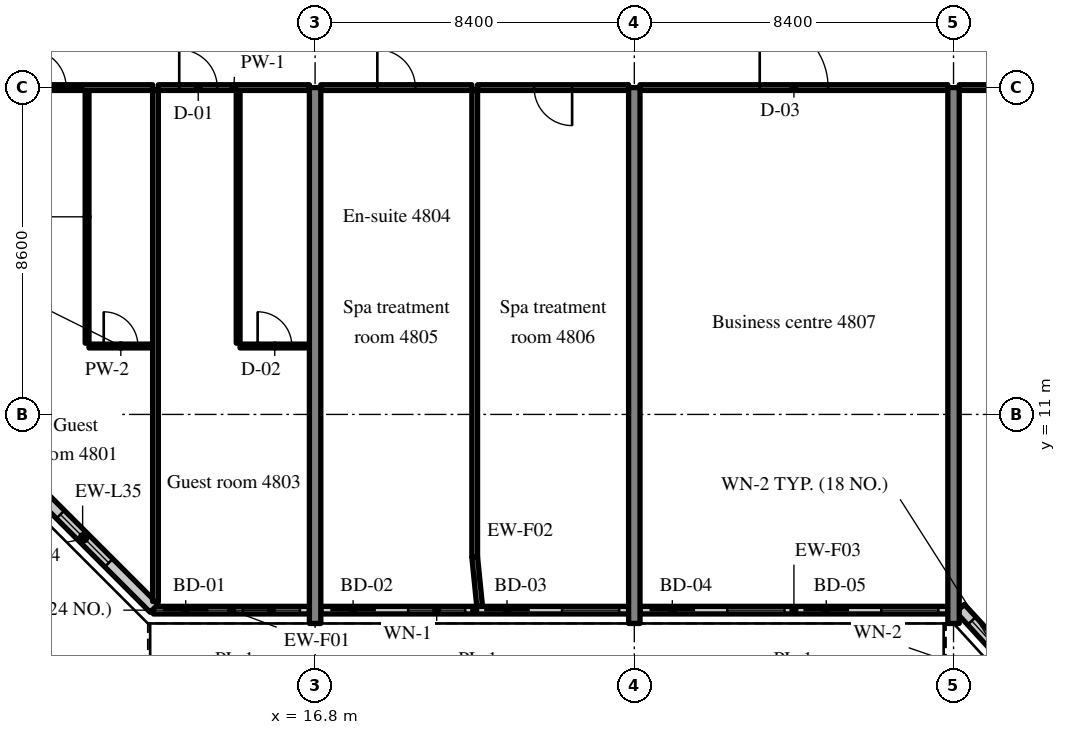
"""IFC4 building model, lengths in metres.
Left out: names, types, materials, properties, quantities, classifications, styles, units other than length and angle.
Written with IfcOpenShell. Run it as: python <this file> out.ifc"""

import sys

from ifc_helpers import new_model, si_unit, direction, frame, frame_2d, origin, place, context, subcontext, project, spatial, rectangle, extrude, source, transform, mapped, element, fill, save


model = new_model("IFC4")
c1 = context("Model", 3, precision=1e-05, world=origin(), true_north=direction((0.0, 1.0)))
c2 = subcontext(c1, "Body", "Model", "MODEL_VIEW")
j1 = project(units=[si_unit("LENGTHUNIT", "METRE"), si_unit("PLANEANGLEUNIT", "RADIAN")], contexts=[c1])
p1 = place(None, origin())
s1 = spatial("IfcSite", under=j1, at=p1, CompositionType="ELEMENT")
p2 = place(p1, origin())
s2 = spatial("IfcBuilding", under=s1, at=p2, CompositionType="ELEMENT")
p3 = place(p2, frame((0.0, 0.0, 197.2)))
s3 = spatial("IfcBuildingStorey", under=s2, at=p3, CompositionType="ELEMENT", Elevation=197.2)
m1 = source(origin(), c2, "Body", "SweptSolid", [
    extrude(rectangle(XDim=14.1, YDim=0.3, at=frame_2d((7.05, 0.0))), origin(), (0.0, 0.0, 1.0), 3.52),
])
for number, where, z_axis, x_axis in (
    (1, (16.8, 5.5, 0.0), (0.0, 0.0, 1.0), (0.0, 1.0, 0.0)),
    (2, (25.2, 5.5, 0.0), (0.0, 0.0, 1.0), (0.0, 1.0, 0.0)),
    (3, (33.6, 5.5, 0.0), (0.0, 0.0, 1.0), (0.0, 1.0, 0.0)),
):
    element("IfcWall", number, at=place(p3, frame(where, z_axis=z_axis, x_axis=x_axis)), inside=s3, PredefinedType="SHEAR", context=c2, shape_type="MappedRepresentation", body=[
        mapped(m1, transform((0.0, 0.0, 0.0), scale=1.0)),
    ])
m2 = source(origin(), c2, "Body", "SweptSolid", [
    extrude(rectangle(XDim=4.105, YDim=0.2, at=frame_2d((2.052, 0.0))), origin(), (0.0, 0.0, 1.0), 2.87),
])
p4 = place(p3, frame((12.545, 5.85, 0.0), z_axis=(0.0, 0.0, 1.0), x_axis=(1.0, 0.0, 0.0)))
e4 = element("IfcWall", 4, at=p4, inside=s3, PredefinedType="SOLIDWALL", context=c2, shape_type="MappedRepresentation", body=[
    mapped(m2, transform((0.0, 0.0, 0.0), scale=1.0)),
])
m3 = source(origin(), c2, "Body", "SweptSolid", [
    extrude(rectangle(XDim=1.2, YDim=2.4, at=frame_2d((0.6, 1.2))), frame((0.0, 0.11, 0.0), z_axis=(0.0, -1.0, 0.0), x_axis=(1.0, 0.0, 0.0)), (0.0, 0.0, 1.0), 0.22),
])
p5 = place(p4, frame((0.25, 0.0, 0.0)))
e5 = element("IfcOpeningElement", 5, at=p5, cuts=e4, PredefinedType="OPENING", context=c2, shape_type="MappedRepresentation", body=[
    mapped(m3, transform((0.0, 0.0, 0.0), scale=1.0)),
])
m4 = source(origin(), c2, "Body", "SweptSolid", [
    extrude(rectangle(XDim=1.5, YDim=1.5, at=frame_2d((0.75, 0.75))), frame((0.0, 0.11, 0.0), z_axis=(0.0, -1.0, 0.0), x_axis=(1.0, 0.0, 0.0)), (0.0, 0.0, 1.0), 0.22),
])
p6 = place(p4, frame((2.355, 0.0, 0.9)))
e6 = element("IfcOpeningElement", 6, at=p6, cuts=e4, PredefinedType="OPENING", context=c2, shape_type="MappedRepresentation", body=[
    mapped(m4, transform((0.0, 0.0, 0.0), scale=1.0)),
])
m5 = source(origin(), c2, "Body", "SweptSolid", [
    extrude(rectangle(XDim=8.1, YDim=0.2, at=frame_2d((4.05, 0.0))), origin(), (0.0, 0.0, 1.0), 2.87),
])
p7 = place(p3, frame((16.95, 5.85, 0.0), z_axis=(0.0, 0.0, 1.0), x_axis=(1.0, 0.0, 0.0)))
e7 = element("IfcWall", 7, at=p7, inside=s3, PredefinedType="SOLIDWALL", context=c2, shape_type="MappedRepresentation", body=[
    mapped(m5, transform((0.0, 0.0, 0.0), scale=1.0)),
])
p8 = place(p7, frame((0.25, 0.0, 0.0)))
e8 = element("IfcOpeningElement", 8, at=p8, cuts=e7, PredefinedType="OPENING", context=c2, shape_type="MappedRepresentation", body=[
    mapped(m3, transform((0.0, 0.0, 0.0), scale=1.0)),
])
p9 = place(p7, frame((2.3, 0.0, 0.9)))
e9 = element("IfcOpeningElement", 9, at=p9, cuts=e7, PredefinedType="OPENING", context=c2, shape_type="MappedRepresentation", body=[
    mapped(m4, transform((0.0, 0.0, 0.0), scale=1.0)),
])
p10 = place(p7, frame((4.3, 0.0, 0.0)))
e10 = element("IfcOpeningElement", 10, at=p10, cuts=e7, PredefinedType="OPENING", context=c2, shape_type="MappedRepresentation", body=[
    mapped(m3, transform((0.0, 0.0, 0.0), scale=1.0)),
])
p11 = place(p7, frame((6.35, 0.0, 0.9)))
e11 = element("IfcOpeningElement", 11, at=p11, cuts=e7, PredefinedType="OPENING", context=c2, shape_type="MappedRepresentation", body=[
    mapped(m4, transform((0.0, 0.0, 0.0), scale=1.0)),
])
m6 = source(origin(), c2, "Body", "SweptSolid", [
    extrude(rectangle(XDim=8.1, YDim=0.2, at=frame_2d((4.05, 0.0))), origin(), (0.0, 0.0, 1.0), 2.87),
])
p12 = place(p3, frame((25.35, 5.85, 0.0), z_axis=(0.0, 0.0, 1.0), x_axis=(1.0, 0.0, 0.0)))
e12 = element("IfcWall", 12, at=p12, inside=s3, PredefinedType="SOLIDWALL", context=c2, shape_type="MappedRepresentation", body=[
    mapped(m6, transform((0.0, 0.0, 0.0), scale=1.0)),
])
p13 = place(p12, frame((0.25, 0.0, 0.0)))
e13 = element("IfcOpeningElement", 13, at=p13, cuts=e12, PredefinedType="OPENING", context=c2, shape_type="MappedRepresentation", body=[
    mapped(m3, transform((0.0, 0.0, 0.0), scale=1.0)),
])
p14 = place(p12, frame((2.3, 0.0, 0.9)))
e14 = element("IfcOpeningElement", 14, at=p14, cuts=e12, PredefinedType="OPENING", context=c2, shape_type="MappedRepresentation", body=[
    mapped(m4, transform((0.0, 0.0, 0.0), scale=1.0)),
])
p15 = place(p12, frame((4.3, 0.0, 0.0)))
e15 = element("IfcOpeningElement", 15, at=p15, cuts=e12, PredefinedType="OPENING", context=c2, shape_type="MappedRepresentation", body=[
    mapped(m3, transform((0.0, 0.0, 0.0), scale=1.0)),
])
p16 = place(p12, frame((6.35, 0.0, 0.9)))
e16 = element("IfcOpeningElement", 16, at=p16, cuts=e12, PredefinedType="OPENING", context=c2, shape_type="MappedRepresentation", body=[
    mapped(m4, transform((0.0, 0.0, 0.0), scale=1.0)),
])
m7 = source(origin(), c2, "Body", "SweptSolid", [
    extrude(rectangle(XDim=2.398, YDim=0.3, at=frame_2d((1.199, 0.0))), origin(), (0.0, 0.0, 1.0), 3.52),
])
p17 = place(p3, frame((33.776, 5.9, 0.0), z_axis=(0.0, 0.0, 1.0), x_axis=(0.675374189419, -0.737475222815, 0.0)))
e17 = element("IfcWall", 17, at=p17, inside=s3, PredefinedType="SOLIDWALL", context=c2, shape_type="MappedRepresentation", body=[
    mapped(m7, transform((0.0, 0.0, 0.0), scale=1.0)),
])
m8 = source(origin(), c2, "Body", "SweptSolid", [
    extrude(rectangle(XDim=1.5, YDim=2.0, at=frame_2d((0.75, 1.0))), frame((0.0, 0.16, 0.0), z_axis=(0.0, -1.0, 0.0), x_axis=(1.0, 0.0, 0.0)), (0.0, 0.0, 1.0), 0.32),
])
p18 = place(p17, frame((0.449, 0.0, 0.9)))
e18 = element("IfcOpeningElement", 18, at=p18, cuts=e17, PredefinedType="OPENING", context=c2, shape_type="MappedRepresentation", body=[
    mapped(m8, transform((0.0, 0.0, 0.0), scale=1.0)),
])
m9 = source(origin(), c2, "Body", "SweptSolid", [
    extrude(rectangle(XDim=5.326, YDim=0.3, at=frame_2d((2.663, 0.0))), origin(), (0.0, 0.0, 1.0), 3.52),
])
p19 = place(p3, frame((8.8, 9.666, 0.0), z_axis=(0.0, 0.0, 1.0), x_axis=(0.707083859269, -0.707129702361, 0.0)))
e19 = element("IfcWall", 19, at=p19, inside=s3, PredefinedType="SOLIDWALL", context=c2, shape_type="MappedRepresentation", body=[
    mapped(m9, transform((0.0, 0.0, 0.0), scale=1.0)),
])
m10 = source(origin(), c2, "Body", "SweptSolid", [
    extrude(rectangle(XDim=1.8, YDim=1.5, at=frame_2d((0.9, 0.75))), frame((0.0, 0.16, 0.0), z_axis=(0.0, -1.0, 0.0), x_axis=(1.0, 0.0, 0.0)), (0.0, 0.0, 1.0), 0.32),
])
p20 = place(p19, frame((1.836, 0.0, 0.9)))
e20 = element("IfcOpeningElement", 20, at=p20, cuts=e19, PredefinedType="OPENING", context=c2, shape_type="MappedRepresentation", body=[
    mapped(m10, transform((0.0, 0.0, 0.0), scale=1.0)),
])
m11 = source(origin(), c2, "Body", "SweptSolid", [
    extrude(rectangle(XDim=6.65, YDim=0.1, at=frame_2d((3.325, 0.0))), origin(), (0.0, 0.0, 1.0), 3.52),
])
p21 = place(p3, frame((10.8, 12.875, 0.0), z_axis=(0.0, 0.0, 1.0), x_axis=(0.0, 1.0, 0.0)))
e21 = element("IfcWall", 21, at=p21, inside=s3, PredefinedType="PARTITIONING", context=c2, shape_type="MappedRepresentation", body=[
    mapped(m11, transform((0.0, 0.0, 0.0), scale=1.0)),
])
m12 = source(origin(), c2, "Body", "SweptSolid", [
    extrude(rectangle(XDim=1.675, YDim=0.1, at=frame_2d((0.837, 0.0))), origin(), (0.0, 0.0, 1.0), 3.52),
])
p22 = place(p3, frame((10.85, 12.8, 0.0), z_axis=(0.0, 0.0, 1.0), x_axis=(1.0, 0.0, 0.0)))
e22 = element("IfcWall", 22, at=p22, inside=s3, PredefinedType="PARTITIONING", context=c2, shape_type="MappedRepresentation", body=[
    mapped(m12, transform((0.0, 0.0, 0.0), scale=1.0)),
])
m13 = source(origin(), c2, "Body", "SweptSolid", [
    extrude(rectangle(XDim=0.9, YDim=2.1, at=frame_2d((0.45, 1.05))), frame((0.0, 0.06, 0.0), z_axis=(0.0, -1.0, 0.0), x_axis=(1.0, 0.0, 0.0)), (0.0, 0.0, 1.0), 0.12),
])
p23 = place(p22, frame((0.388, 0.0, 0.0)))
e23 = element("IfcOpeningElement", 23, at=p23, cuts=e22, PredefinedType="OPENING", context=c2, shape_type="MappedRepresentation", body=[
    mapped(m13, transform((0.0, 0.0, 0.0), scale=1.0)),
])
m14 = source(origin(), c2, "Body", "SweptSolid", [
    extrude(rectangle(XDim=3.825, YDim=0.15, at=frame_2d((1.913, 0.0))), origin(), (0.0, 0.0, 1.0), 2.82),
])
p24 = place(p3, frame((8.7, 19.6, 0.0), z_axis=(0.0, 0.0, 1.0), x_axis=(1.0, 0.0, 0.0)))
e24 = element("IfcWall", 24, at=p24, inside=s3, PredefinedType="PARTITIONING", context=c2, shape_type="MappedRepresentation", body=[
    mapped(m14, transform((0.0, 0.0, 0.0), scale=1.0)),
])
m15 = source(origin(), c2, "Body", "SweptSolid", [
    extrude(rectangle(XDim=1.0, YDim=2.1, at=frame_2d((0.5, 1.05))), frame((0.0, 0.085, 0.0), z_axis=(0.0, -1.0, 0.0), x_axis=(1.0, 0.0, 0.0)), (0.0, 0.0, 1.0), 0.17),
])
p25 = place(p24, frame((0.55, 0.0, 0.0)))
e25 = element("IfcOpeningElement", 25, at=p25, cuts=e24, PredefinedType="OPENING", context=c2, shape_type="MappedRepresentation", body=[
    mapped(m15, transform((0.0, 0.0, 0.0), scale=1.0)),
])
p26 = place(p3, frame((14.775, 12.875, 0.0), z_axis=(0.0, 0.0, 1.0), x_axis=(0.0, 1.0, 0.0)))
e26 = element("IfcWall", 26, at=p26, inside=s3, PredefinedType="PARTITIONING", context=c2, shape_type="MappedRepresentation", body=[
    mapped(m11, transform((0.0, 0.0, 0.0), scale=1.0)),
])
m16 = source(origin(), c2, "Body", "SweptSolid", [
    extrude(rectangle(XDim=1.825, YDim=0.1, at=frame_2d((0.913, 0.0))), origin(), (0.0, 0.0, 1.0), 3.52),
])
p27 = place(p3, frame((14.825, 12.8, 0.0), z_axis=(0.0, 0.0, 1.0), x_axis=(1.0, 0.0, 0.0)))
e27 = element("IfcWall", 27, at=p27, inside=s3, PredefinedType="PARTITIONING", context=c2, shape_type="MappedRepresentation", body=[
    mapped(m16, transform((0.0, 0.0, 0.0), scale=1.0)),
])
p28 = place(p27, frame((0.463, 0.0, 0.0)))
e28 = element("IfcOpeningElement", 28, at=p28, cuts=e27, PredefinedType="OPENING", context=c2, shape_type="MappedRepresentation", body=[
    mapped(m13, transform((0.0, 0.0, 0.0), scale=1.0)),
])
m17 = source(origin(), c2, "Body", "SweptSolid", [
    extrude(rectangle(XDim=3.975, YDim=0.15, at=frame_2d((1.987, 0.0))), origin(), (0.0, 0.0, 1.0), 2.82),
])
p29 = place(p3, frame((12.675, 19.6, 0.0), z_axis=(0.0, 0.0, 1.0), x_axis=(1.0, 0.0, 0.0)))
e29 = element("IfcWall", 29, at=p29, inside=s3, PredefinedType="PARTITIONING", context=c2, shape_type="MappedRepresentation", body=[
    mapped(m17, transform((0.0, 0.0, 0.0), scale=1.0)),
])
p30 = place(p29, frame((0.55, 0.0, 0.0)))
e30 = element("IfcOpeningElement", 30, at=p30, cuts=e29, PredefinedType="OPENING", context=c2, shape_type="MappedRepresentation", body=[
    mapped(m15, transform((0.0, 0.0, 0.0), scale=1.0)),
])
m18 = source(origin(), c2, "Body", "SweptSolid", [
    extrude(rectangle(XDim=13.447, YDim=0.15, at=frame_2d((6.724, 0.0))), origin(), (0.0, 0.0, 1.0), 3.52),
])
p31 = place(p3, frame((12.6, 6.078, 0.0), z_axis=(0.0, 0.0, 1.0), x_axis=(0.0, 1.0, 0.0)))
e31 = element("IfcWall", 31, at=p31, inside=s3, PredefinedType="PARTITIONING", context=c2, shape_type="MappedRepresentation", body=[
    mapped(m18, transform((0.0, 0.0, 0.0), scale=1.0)),
])
m19 = source(origin(), c2, "Body", "SweptSolid", [
    extrude(rectangle(XDim=3.975, YDim=0.15, at=frame_2d((1.988, 0.0))), origin(), (0.0, 0.0, 1.0), 2.82),
])
p32 = place(p3, frame((16.95, 19.6, 0.0), z_axis=(0.0, 0.0, 1.0), x_axis=(1.0, 0.0, 0.0)))
e32 = element("IfcWall", 32, at=p32, inside=s3, PredefinedType="PARTITIONING", context=c2, shape_type="MappedRepresentation", body=[
    mapped(m19, transform((0.0, 0.0, 0.0), scale=1.0)),
])
p33 = place(p32, frame((1.488, 0.0, 0.0)))
e33 = element("IfcOpeningElement", 33, at=p33, cuts=e32, PredefinedType="OPENING", context=c2, shape_type="MappedRepresentation", body=[
    mapped(m15, transform((0.0, 0.0, 0.0), scale=1.0)),
])
p34 = place(p3, frame((21.075, 19.6, 0.0), z_axis=(0.0, 0.0, 1.0), x_axis=(1.0, 0.0, 0.0)))
e34 = element("IfcWall", 34, at=p34, inside=s3, PredefinedType="PARTITIONING", context=c2, shape_type="MappedRepresentation", body=[
    mapped(m19, transform((0.0, 0.0, 0.0), scale=1.0)),
])
p35 = place(p34, frame((1.488, 0.0, 0.0)))
e35 = element("IfcOpeningElement", 35, at=p35, cuts=e34, PredefinedType="OPENING", context=c2, shape_type="MappedRepresentation", body=[
    mapped(m15, transform((0.0, 0.0, 0.0), scale=1.0)),
])
m20 = source(origin(), c2, "Body", "SweptSolid", [
    extrude(rectangle(XDim=12.275, YDim=0.15, at=frame_2d((6.137, 0.0))), origin(), (0.0, 0.0, 1.0), 3.52),
])
p36 = place(p3, frame((21.0, 7.25, 0.0), z_axis=(0.0, 0.0, 1.0), x_axis=(0.0, 1.0, 0.0)))
e36 = element("IfcWall", 36, at=p36, inside=s3, PredefinedType="PARTITIONING", context=c2, shape_type="MappedRepresentation", body=[
    mapped(m20, transform((0.0, 0.0, 0.0), scale=1.0)),
])
m21 = source(origin(), c2, "Body", "SweptSolid", [
    extrude(rectangle(XDim=8.1, YDim=0.15, at=frame_2d((4.05, 0.0))), origin(), (0.0, 0.0, 1.0), 2.82),
])
p37 = place(p3, frame((25.35, 19.6, 0.0), z_axis=(0.0, 0.0, 1.0), x_axis=(1.0, 0.0, 0.0)))
e37 = element("IfcWall", 37, at=p37, inside=s3, PredefinedType="PARTITIONING", context=c2, shape_type="MappedRepresentation", body=[
    mapped(m21, transform((0.0, 0.0, 0.0), scale=1.0)),
])
m22 = source(origin(), c2, "Body", "SweptSolid", [
    extrude(rectangle(XDim=1.8, YDim=2.1, at=frame_2d((0.9, 1.05))), frame((0.0, 0.085, 0.0), z_axis=(0.0, -1.0, 0.0), x_axis=(1.0, 0.0, 0.0)), (0.0, 0.0, 1.0), 0.17),
])
p38 = place(p37, frame((3.15, 0.0, 0.0)))
e38 = element("IfcOpeningElement", 38, at=p38, cuts=e37, PredefinedType="OPENING", context=c2, shape_type="MappedRepresentation", body=[
    mapped(m22, transform((0.0, 0.0, 0.0), scale=1.0)),
])
m23 = source(origin(), c2, "Body", "SweptSolid", [
    extrude(rectangle(XDim=8.1, YDim=0.15, at=frame_2d((4.05, 0.0))), origin(), (0.0, 0.0, 1.0), 2.82),
])
p39 = place(p3, frame((33.75, 19.6, 0.0), z_axis=(0.0, 0.0, 1.0), x_axis=(1.0, 0.0, 0.0)))
e39 = element("IfcWall", 39, at=p39, inside=s3, PredefinedType="PARTITIONING", context=c2, shape_type="MappedRepresentation", body=[
    mapped(m23, transform((0.0, 0.0, 0.0), scale=1.0)),
])
p40 = place(p39, frame((3.15, 0.0, 0.0)))
e40 = element("IfcOpeningElement", 40, at=p40, cuts=e39, PredefinedType="OPENING", context=c2, shape_type="MappedRepresentation", body=[
    mapped(m22, transform((0.0, 0.0, 0.0), scale=1.0)),
])
m24 = source(origin(), c2, "Body", "SweptSolid", [
    extrude(rectangle(XDim=1.307, YDim=0.15, at=frame_2d((0.653, 0.0))), origin(), (0.0, 0.0, 1.0), 3.52),
])
p41 = place(p3, frame((21.13, 5.95, 0.0), z_axis=(0.0, 0.0, 1.0), x_axis=(-0.099411212066, 0.995046436562, 0.0)))
e41 = element("IfcWall", 41, at=p41, inside=s3, PredefinedType="PARTITIONING", context=c2, shape_type="MappedRepresentation", body=[
    mapped(m24, transform((0.0, 0.0, 0.0), scale=1.0)),
])
m25 = source(origin(), c2, "Body", "SweptSolid", [
    extrude(rectangle(XDim=1.2, YDim=2.4, at=frame_2d((0.6, 1.2))), frame((0.0, 0.025, 0.0), z_axis=(0.0, -1.0, 0.0), x_axis=(1.0, 0.0, 0.0)), (0.0, 0.0, 1.0), 0.05),
])
p42 = place(p5, origin())
e42 = element("IfcDoor", 42, at=p42, inside=s3, OperationType="SLIDING_TO_LEFT", PredefinedType="DOOR", context=c2, shape_type="MappedRepresentation", body=[
    mapped(m25, transform((0.0, 0.0, 0.0), scale=1.0)),
])
fill(e5, e42)
m26 = source(origin(), c2, "Body", "SweptSolid", [
    extrude(rectangle(XDim=1.5, YDim=1.5, at=frame_2d((0.75, 0.75))), frame((0.0, 0.03, 0.0), z_axis=(0.0, -1.0, 0.0), x_axis=(1.0, 0.0, 0.0)), (0.0, 0.0, 1.0), 0.06),
])
p43 = place(p6, origin())
e43 = element("IfcWindow", 43, at=p43, inside=s3, PartitioningType="SINGLE_PANEL", PredefinedType="WINDOW", context=c2, shape_type="MappedRepresentation", body=[
    mapped(m26, transform((0.0, 0.0, 0.0), scale=1.0)),
])
fill(e6, e43)
p44 = place(p8, origin())
e44 = element("IfcDoor", 44, at=p44, inside=s3, OperationType="SLIDING_TO_RIGHT", PredefinedType="DOOR", context=c2, shape_type="MappedRepresentation", body=[
    mapped(m25, transform((0.0, 0.0, 0.0), scale=1.0)),
])
fill(e8, e44)
p45 = place(p9, origin())
e45 = element("IfcWindow", 45, at=p45, inside=s3, PartitioningType="SINGLE_PANEL", PredefinedType="WINDOW", context=c2, shape_type="MappedRepresentation", body=[
    mapped(m26, transform((0.0, 0.0, 0.0), scale=1.0)),
])
fill(e9, e45)
p46 = place(p10, origin())
e46 = element("IfcDoor", 46, at=p46, inside=s3, OperationType="SLIDING_TO_LEFT", PredefinedType="DOOR", context=c2, shape_type="MappedRepresentation", body=[
    mapped(m25, transform((0.0, 0.0, 0.0), scale=1.0)),
])
fill(e10, e46)
p47 = place(p11, origin())
e47 = element("IfcWindow", 47, at=p47, inside=s3, PartitioningType="SINGLE_PANEL", PredefinedType="WINDOW", context=c2, shape_type="MappedRepresentation", body=[
    mapped(m26, transform((0.0, 0.0, 0.0), scale=1.0)),
])
fill(e11, e47)
p48 = place(p13, origin())
e48 = element("IfcDoor", 48, at=p48, inside=s3, OperationType="SLIDING_TO_RIGHT", PredefinedType="DOOR", context=c2, shape_type="MappedRepresentation", body=[
    mapped(m25, transform((0.0, 0.0, 0.0), scale=1.0)),
])
fill(e13, e48)
p49 = place(p14, origin())
e49 = element("IfcWindow", 49, at=p49, inside=s3, PartitioningType="SINGLE_PANEL", PredefinedType="WINDOW", context=c2, shape_type="MappedRepresentation", body=[
    mapped(m26, transform((0.0, 0.0, 0.0), scale=1.0)),
])
fill(e14, e49)
p50 = place(p15, origin())
e50 = element("IfcDoor", 50, at=p50, inside=s3, OperationType="SLIDING_TO_LEFT", PredefinedType="DOOR", context=c2, shape_type="MappedRepresentation", body=[
    mapped(m25, transform((0.0, 0.0, 0.0), scale=1.0)),
])
fill(e15, e50)
p51 = place(p16, origin())
e51 = element("IfcWindow", 51, at=p51, inside=s3, PartitioningType="SINGLE_PANEL", PredefinedType="WINDOW", context=c2, shape_type="MappedRepresentation", body=[
    mapped(m26, transform((0.0, 0.0, 0.0), scale=1.0)),
])
fill(e16, e51)
m27 = source(origin(), c2, "Body", "SweptSolid", [
    extrude(rectangle(XDim=1.5, YDim=2.0, at=frame_2d((0.75, 1.0))), frame((0.0, 0.03, 0.0), z_axis=(0.0, -1.0, 0.0), x_axis=(1.0, 0.0, 0.0)), (0.0, 0.0, 1.0), 0.06),
])
p52 = place(p18, origin())
e52 = element("IfcWindow", 52, at=p52, inside=s3, PartitioningType="SINGLE_PANEL", PredefinedType="WINDOW", context=c2, shape_type="MappedRepresentation", body=[
    mapped(m27, transform((0.0, 0.0, 0.0), scale=1.0)),
])
fill(e18, e52)
m28 = source(origin(), c2, "Body", "SweptSolid", [
    extrude(rectangle(XDim=1.8, YDim=1.5, at=frame_2d((0.9, 0.75))), frame((0.0, 0.03, 0.0), z_axis=(0.0, -1.0, 0.0), x_axis=(1.0, 0.0, 0.0)), (0.0, 0.0, 1.0), 0.06),
])
p53 = place(p20, origin())
e53 = element("IfcWindow", 53, at=p53, inside=s3, PartitioningType="SINGLE_PANEL", PredefinedType="WINDOW", context=c2, shape_type="MappedRepresentation", body=[
    mapped(m28, transform((0.0, 0.0, 0.0), scale=1.0)),
])
fill(e20, e53)
m29 = source(origin(), c2, "Body", "SweptSolid", [
    extrude(rectangle(XDim=0.9, YDim=2.1, at=frame_2d((0.45, 1.05))), frame((0.0, 0.025, 0.0), z_axis=(0.0, -1.0, 0.0), x_axis=(1.0, 0.0, 0.0)), (0.0, 0.0, 1.0), 0.05),
])
p54 = place(p23, origin())
e54 = element("IfcDoor", 54, at=p54, inside=s3, OperationType="SINGLE_SWING_LEFT", PredefinedType="DOOR", context=c2, shape_type="MappedRepresentation", body=[
    mapped(m29, transform((0.0, 0.0, 0.0), scale=1.0)),
])
fill(e23, e54)
m30 = source(origin(), c2, "Body", "SweptSolid", [
    extrude(rectangle(XDim=1.0, YDim=2.1, at=frame_2d((0.5, 1.05))), frame((0.0, 0.025, 0.0), z_axis=(0.0, -1.0, 0.0), x_axis=(1.0, 0.0, 0.0)), (0.0, 0.0, 1.0), 0.05),
])
p55 = place(p25, origin())
e55 = element("IfcDoor", 55, at=p55, inside=s3, OperationType="SINGLE_SWING_LEFT", PredefinedType="DOOR", context=c2, shape_type="MappedRepresentation", body=[
    mapped(m30, transform((0.0, 0.0, 0.0), scale=1.0)),
])
fill(e25, e55)
p56 = place(p28, origin())
e56 = element("IfcDoor", 56, at=p56, inside=s3, OperationType="SINGLE_SWING_LEFT", PredefinedType="DOOR", context=c2, shape_type="MappedRepresentation", body=[
    mapped(m29, transform((0.0, 0.0, 0.0), scale=1.0)),
])
fill(e28, e56)
p57 = place(p30, origin())
e57 = element("IfcDoor", 57, at=p57, inside=s3, OperationType="SINGLE_SWING_LEFT", PredefinedType="DOOR", context=c2, shape_type="MappedRepresentation", body=[
    mapped(m30, transform((0.0, 0.0, 0.0), scale=1.0)),
])
fill(e30, e57)
p58 = place(p33, origin())
e58 = element("IfcDoor", 58, at=p58, inside=s3, OperationType="SINGLE_SWING_LEFT", PredefinedType="DOOR", context=c2, shape_type="MappedRepresentation", body=[
    mapped(m30, transform((0.0, 0.0, 0.0), scale=1.0)),
])
fill(e33, e58)
p59 = place(p35, origin())
e59 = element("IfcDoor", 59, at=p59, inside=s3, OperationType="SINGLE_SWING_RIGHT", PredefinedType="DOOR", context=c2, shape_type="MappedRepresentation", body=[
    mapped(m30, transform((0.0, 0.0, 0.0), scale=1.0)),
])
fill(e35, e59)
m31 = source(origin(), c2, "Body", "SweptSolid", [
    extrude(rectangle(XDim=1.8, YDim=2.1, at=frame_2d((0.9, 1.05))), frame((0.0, 0.025, 0.0), z_axis=(0.0, -1.0, 0.0), x_axis=(1.0, 0.0, 0.0)), (0.0, 0.0, 1.0), 0.05),
])
p60 = place(p38, origin())
e60 = element("IfcDoor", 60, at=p60, inside=s3, OperationType="DOUBLE_DOOR_SINGLE_SWING", PredefinedType="DOOR", context=c2, shape_type="MappedRepresentation", body=[
    mapped(m31, transform((0.0, 0.0, 0.0), scale=1.0)),
])
fill(e38, e60)
save(model, sys.argv[1])
